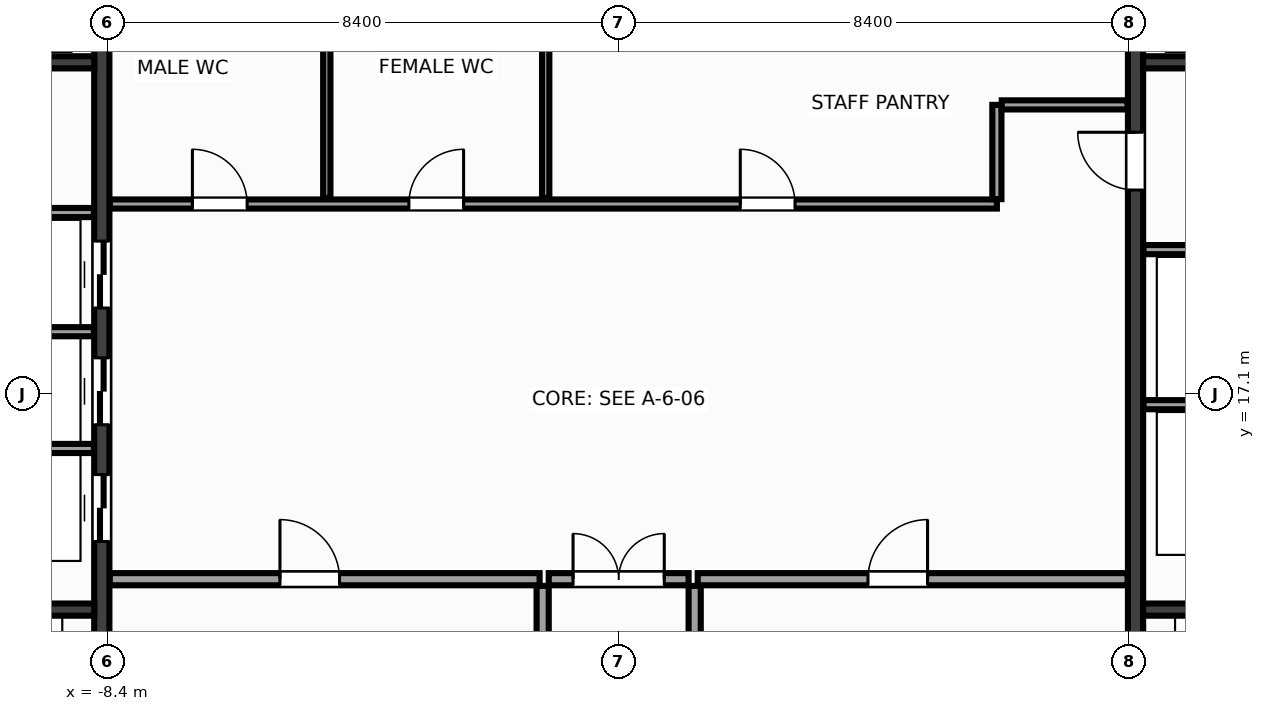
"""IFC4 building model, lengths in metres.
Left out: names, types, materials, properties, quantities, classifications, styles, units other than length and angle.
Written with IfcOpenShell. Run it as: python <this file> out.ifc"""

import sys

from ifc_helpers import new_model, si_unit, direction, frame, frame_2d, origin, place, context, subcontext, project, spatial, rectangle, extrude, source, transform, mapped, element, fill, save


model = new_model("IFC4")
c1 = context("Model", 3, precision=1e-05, world=origin(), true_north=direction((0.0, 1.0)))
c2 = subcontext(c1, "Body", "Model", "MODEL_VIEW")
j1 = project(units=[si_unit("LENGTHUNIT", "METRE"), si_unit("PLANEANGLEUNIT", "RADIAN")], contexts=[c1])
p1 = place(None, origin())
s1 = spatial("IfcSite", under=j1, at=p1, CompositionType="ELEMENT")
p2 = place(p1, origin())
s2 = spatial("IfcBuilding", under=s1, at=p2, CompositionType="ELEMENT")
p3 = place(p2, frame((0.0, 0.0, 203.6)))
s3 = spatial("IfcBuildingStorey", under=s2, at=p3, CompositionType="ELEMENT", Elevation=203.6)
m1 = source(origin(), c2, "Body", "SweptSolid", [
    extrude(rectangle(XDim=13.1, YDim=0.25, at=frame_2d((6.55, 0.0))), origin(), (0.0, 0.0, 1.0), 3.6),
])
p4 = place(p3, frame((-8.5, 10.45, 0.0), z_axis=(0.0, 0.0, 1.0), x_axis=(0.0, 1.0, 0.0)))
e1 = element("IfcWall", 1, at=p4, inside=s3, PredefinedType="SHEAR", context=c2, shape_type="MappedRepresentation", body=[
    mapped(m1, transform((0.0, 0.0, 0.0), x_axis=(1.0, 0.0, 0.0), y_axis=(0.0, 1.0, 0.0), z_axis=(0.0, 0.0, 1.0), scale=1.0)),
])
p5 = place(p4, frame((4.22, 0.0, 0.0)))
e2 = element("IfcOpeningElement", 2, at=p5, cuts=e1, PredefinedType="OPENING", context=c2, shape_type="SweptSolid", body=[
    extrude(rectangle(XDim=1.1, YDim=2.15, at=frame_2d((0.55, 1.075))), frame((0.0, 0.137, 0.0), z_axis=(0.0, -1.0, 0.0), x_axis=(1.0, 0.0, 0.0)), (0.0, 0.0, 1.0), 0.274),
])
p6 = place(p4, frame((6.14, 0.0, 0.0)))
e3 = element("IfcOpeningElement", 3, at=p6, cuts=e1, PredefinedType="OPENING", context=c2, shape_type="SweptSolid", body=[
    extrude(rectangle(XDim=1.1, YDim=2.15, at=frame_2d((0.55, 1.075))), frame((0.0, 0.137, 0.0), z_axis=(0.0, -1.0, 0.0), x_axis=(1.0, 0.0, 0.0)), (0.0, 0.0, 1.0), 0.274),
])
p7 = place(p4, frame((8.06, 0.0, 0.0)))
e4 = element("IfcOpeningElement", 4, at=p7, cuts=e1, PredefinedType="OPENING", context=c2, shape_type="SweptSolid", body=[
    extrude(rectangle(XDim=1.1, YDim=2.15, at=frame_2d((0.55, 1.075))), frame((0.0, 0.137, 0.0), z_axis=(0.0, -1.0, 0.0), x_axis=(1.0, 0.0, 0.0)), (0.0, 0.0, 1.0), 0.274),
])
p8 = place(p3, frame((8.5, 10.45, 0.0), z_axis=(0.0, 0.0, 1.0), x_axis=(0.0, 1.0, 0.0)))
e5 = element("IfcWall", 5, at=p8, inside=s3, PredefinedType="SHEAR", context=c2, shape_type="MappedRepresentation", body=[
    mapped(m1, transform((0.0, 0.0, 0.0), x_axis=(1.0, 0.0, 0.0), y_axis=(0.0, 1.0, 0.0), z_axis=(0.0, 0.0, 1.0), scale=1.0)),
])
p9 = place(p8, frame((10.0, 0.0, 0.0)))
e6 = element("IfcOpeningElement", 6, at=p9, cuts=e5, PredefinedType="OPENING", context=c2, shape_type="SweptSolid", body=[
    extrude(rectangle(XDim=0.95, YDim=2.15, at=frame_2d((0.475, 1.075))), frame((0.0, 0.137, 0.0), z_axis=(0.0, -1.0, 0.0), x_axis=(1.0, 0.0, 0.0)), (0.0, 0.0, 1.0), 0.274),
])
m2 = source(origin(), c2, "Body", "SweptSolid", [
    extrude(rectangle(XDim=2.825, YDim=0.2, at=frame_2d((1.413, 0.0))), origin(), (0.0, 0.0, 1.0), 3.6),
])
for number, where, z_axis, x_axis in (
    (7, (-11.45, 13.55, 0.0), (0.0, 0.0, 1.0), (1.0, 0.0, 0.0)),
    (8, (8.625, 13.55, 0.0), (0.0, 0.0, 1.0), (1.0, 0.0, 0.0)),
):
    element("IfcWall", number, at=place(p3, frame(where, z_axis=z_axis, x_axis=x_axis)), inside=s3, PredefinedType="SHEAR", context=c2, shape_type="MappedRepresentation", body=[
        mapped(m2, transform((0.0, 0.0, 0.0), x_axis=(1.0, 0.0, 0.0), y_axis=(0.0, 1.0, 0.0), z_axis=(0.0, 0.0, 1.0), scale=1.0)),
    ])
m3 = source(origin(), c2, "Body", "SweptSolid", [
    extrude(rectangle(XDim=3.02, YDim=0.2, at=frame_2d((1.51, 0.0))), origin(), (0.0, 0.0, 1.0), 3.6),
])
for number, where, z_axis, x_axis in (
    (9, (-11.645, 22.55, 0.0), (0.0, 0.0, 1.0), (1.0, 0.0, 0.0)),
    (10, (8.625, 22.55, 0.0), (0.0, 0.0, 1.0), (1.0, 0.0, 0.0)),
):
    element("IfcWall", number, at=place(p3, frame(where, z_axis=z_axis, x_axis=x_axis)), inside=s3, PredefinedType="SHEAR", context=c2, shape_type="MappedRepresentation", body=[
        mapped(m3, transform((0.0, 0.0, 0.0), x_axis=(1.0, 0.0, 0.0), y_axis=(0.0, 1.0, 0.0), z_axis=(0.0, 0.0, 1.0), scale=1.0)),
    ])
m4 = source(origin(), c2, "Body", "SweptSolid", [
    extrude(rectangle(XDim=3.01, YDim=0.15, at=frame_2d((1.505, 0.0))), origin(), (0.0, 0.0, 1.0), 3.38),
])
for number, where, z_axis, x_axis in (
    (11, (-11.64, 16.2, 0.0), (0.0, 0.0, 1.0), (1.0, 0.0, 0.0)),
    (12, (-11.64, 18.12, 0.0), (0.0, 0.0, 1.0), (1.0, 0.0, 0.0)),
    (13, (-11.64, 20.08, 0.0), (0.0, 0.0, 1.0), (1.0, 0.0, 0.0)),
    (14, (8.63, 16.92, 0.0), (0.0, 0.0, 1.0), (1.0, 0.0, 0.0)),
    (15, (8.63, 19.47, 0.0), (0.0, 0.0, 1.0), (1.0, 0.0, 0.0)),
):
    element("IfcWall", number, at=place(p3, frame(where, z_axis=z_axis, x_axis=x_axis)), inside=s3, PredefinedType="PARTITIONING", context=c2, shape_type="MappedRepresentation", body=[
        mapped(m4, transform((0.0, 0.0, 0.0), x_axis=(1.0, 0.0, 0.0), y_axis=(0.0, 1.0, 0.0), z_axis=(0.0, 0.0, 1.0), scale=1.0)),
    ])
m5 = source(origin(), c2, "Body", "SweptSolid", [
    extrude(rectangle(XDim=7.07, YDim=0.2, at=frame_2d((3.535, 0.0))), origin(), (0.0, 0.0, 1.0), 3.38),
])
p10 = place(p3, frame((-8.37, 14.05, 0.0), z_axis=(0.0, 0.0, 1.0), x_axis=(1.0, 0.0, 0.0)))
e16 = element("IfcWall", 16, at=p10, inside=s3, PredefinedType="PARTITIONING", context=c2, shape_type="MappedRepresentation", body=[
    mapped(m5, transform((0.0, 0.0, 0.0), x_axis=(1.0, 0.0, 0.0), y_axis=(0.0, 1.0, 0.0), z_axis=(0.0, 0.0, 1.0), scale=1.0)),
])
p11 = place(p10, frame((2.8, 0.0, 0.0)))
e17 = element("IfcOpeningElement", 17, at=p11, cuts=e16, PredefinedType="OPENING", context=c2, shape_type="SweptSolid", body=[
    extrude(rectangle(XDim=0.98, YDim=2.15, at=frame_2d((0.49, 1.075))), frame((0.0, 0.112, 0.0), z_axis=(0.0, -1.0, 0.0), x_axis=(1.0, 0.0, 0.0)), (0.0, 0.0, 1.0), 0.224),
])
p12 = place(p3, frame((1.3, 14.05, 0.0), z_axis=(0.0, 0.0, 1.0), x_axis=(1.0, 0.0, 0.0)))
e18 = element("IfcWall", 18, at=p12, inside=s3, PredefinedType="PARTITIONING", context=c2, shape_type="MappedRepresentation", body=[
    mapped(m5, transform((0.0, 0.0, 0.0), x_axis=(1.0, 0.0, 0.0), y_axis=(0.0, 1.0, 0.0), z_axis=(0.0, 0.0, 1.0), scale=1.0)),
])
p13 = place(p12, frame((2.8, 0.0, 0.0)))
e19 = element("IfcOpeningElement", 19, at=p13, cuts=e18, PredefinedType="OPENING", context=c2, shape_type="SweptSolid", body=[
    extrude(rectangle(XDim=0.98, YDim=2.15, at=frame_2d((0.49, 1.075))), frame((0.0, 0.112, 0.0), z_axis=(0.0, -1.0, 0.0), x_axis=(1.0, 0.0, 0.0)), (0.0, 0.0, 1.0), 0.224),
])
m6 = source(origin(), c2, "Body", "SweptSolid", [
    extrude(rectangle(XDim=3.49, YDim=0.2, at=frame_2d((1.745, 0.0))), origin(), (0.0, 0.0, 1.0), 3.38),
])
for number, where, z_axis, x_axis in (
    (20, (-1.25, 10.45, 0.0), (0.0, 0.0, 1.0), (0.0, 1.0, 0.0)),
    (21, (1.25, 10.45, 0.0), (0.0, 0.0, 1.0), (0.0, 1.0, 0.0)),
):
    element("IfcWall", number, at=place(p3, frame(where, z_axis=z_axis, x_axis=x_axis)), inside=s3, PredefinedType="PARTITIONING", context=c2, shape_type="MappedRepresentation", body=[
        mapped(m6, transform((0.0, 0.0, 0.0), x_axis=(1.0, 0.0, 0.0), y_axis=(0.0, 1.0, 0.0), z_axis=(0.0, 0.0, 1.0), scale=1.0)),
    ])
m7 = source(origin(), c2, "Body", "SweptSolid", [
    extrude(rectangle(XDim=2.3, YDim=0.2, at=frame_2d((1.15, 0.0))), origin(), (0.0, 0.0, 1.0), 3.38),
])
p14 = place(p3, frame((-1.15, 14.05, 0.0), z_axis=(0.0, 0.0, 1.0), x_axis=(1.0, 0.0, 0.0)))
e22 = element("IfcWall", 22, at=p14, inside=s3, PredefinedType="PARTITIONING", context=c2, shape_type="MappedRepresentation", body=[
    mapped(m7, transform((0.0, 0.0, 0.0), x_axis=(1.0, 0.0, 0.0), y_axis=(0.0, 1.0, 0.0), z_axis=(0.0, 0.0, 1.0), scale=1.0)),
])
p15 = place(p14, frame((0.4, 0.0, 0.0)))
e23 = element("IfcOpeningElement", 23, at=p15, cuts=e22, PredefinedType="OPENING", context=c2, shape_type="SweptSolid", body=[
    extrude(rectangle(XDim=1.5, YDim=2.2, at=frame_2d((0.75, 1.1))), frame((0.0, 0.112, 0.0), z_axis=(0.0, -1.0, 0.0), x_axis=(1.0, 0.0, 0.0)), (0.0, 0.0, 1.0), 0.224),
])
m8 = source(origin(), c2, "Body", "SweptSolid", [
    extrude(rectangle(XDim=14.59, YDim=0.15, at=frame_2d((7.295, 0.0))), origin(), (0.0, 0.0, 1.0), 3.38),
])
p16 = place(p3, frame((-8.37, 20.22, 0.0), z_axis=(0.0, 0.0, 1.0), x_axis=(1.0, 0.0, 0.0)))
e24 = element("IfcWall", 24, at=p16, inside=s3, PredefinedType="PARTITIONING", context=c2, shape_type="MappedRepresentation", body=[
    mapped(m8, transform((0.0, 0.0, 0.0), x_axis=(1.0, 0.0, 0.0), y_axis=(0.0, 1.0, 0.0), z_axis=(0.0, 0.0, 1.0), scale=1.0)),
])
p17 = place(p16, frame((1.36, 0.0, 0.0)))
e25 = element("IfcOpeningElement", 25, at=p17, cuts=e24, PredefinedType="OPENING", context=c2, shape_type="SweptSolid", body=[
    extrude(rectangle(XDim=0.9, YDim=2.15, at=frame_2d((0.45, 1.075))), frame((0.0, 0.087, 0.0), z_axis=(0.0, -1.0, 0.0), x_axis=(1.0, 0.0, 0.0)), (0.0, 0.0, 1.0), 0.174),
])
p18 = place(p16, frame((4.92, 0.0, 0.0)))
e26 = element("IfcOpeningElement", 26, at=p18, cuts=e24, PredefinedType="OPENING", context=c2, shape_type="SweptSolid", body=[
    extrude(rectangle(XDim=0.9, YDim=2.15, at=frame_2d((0.45, 1.075))), frame((0.0, 0.087, 0.0), z_axis=(0.0, -1.0, 0.0), x_axis=(1.0, 0.0, 0.0)), (0.0, 0.0, 1.0), 0.174),
])
p19 = place(p16, frame((10.37, 0.0, 0.0)))
e27 = element("IfcOpeningElement", 27, at=p19, cuts=e24, PredefinedType="OPENING", context=c2, shape_type="SweptSolid", body=[
    extrude(rectangle(XDim=0.9, YDim=2.15, at=frame_2d((0.45, 1.075))), frame((0.0, 0.087, 0.0), z_axis=(0.0, -1.0, 0.0), x_axis=(1.0, 0.0, 0.0)), (0.0, 0.0, 1.0), 0.174),
])
m9 = source(origin(), c2, "Body", "SweptSolid", [
    extrude(rectangle(XDim=1.55, YDim=0.15, at=frame_2d((0.775, 0.0))), origin(), (0.0, 0.0, 1.0), 3.38),
])
p20 = place(p3, frame((6.22, 20.3, 0.0), z_axis=(0.0, 0.0, 1.0), x_axis=(0.0, 1.0, 0.0)))
e28 = element("IfcWall", 28, at=p20, inside=s3, PredefinedType="PARTITIONING", context=c2, shape_type="MappedRepresentation", body=[
    mapped(m9, transform((0.0, 0.0, 0.0), x_axis=(1.0, 0.0, 0.0), y_axis=(0.0, 1.0, 0.0), z_axis=(0.0, 0.0, 1.0), scale=1.0)),
])
m10 = source(origin(), c2, "Body", "SweptSolid", [
    extrude(rectangle(XDim=2.07, YDim=0.15, at=frame_2d((1.035, 0.0))), origin(), (0.0, 0.0, 1.0), 3.38),
])
p21 = place(p3, frame((6.3, 21.85, 0.0), z_axis=(0.0, 0.0, 1.0), x_axis=(1.0, 0.0, 0.0)))
e29 = element("IfcWall", 29, at=p21, inside=s3, PredefinedType="PARTITIONING", context=c2, shape_type="MappedRepresentation", body=[
    mapped(m10, transform((0.0, 0.0, 0.0), x_axis=(1.0, 0.0, 0.0), y_axis=(0.0, 1.0, 0.0), z_axis=(0.0, 0.0, 1.0), scale=1.0)),
])
m11 = source(origin(), c2, "Body", "SweptSolid", [
    extrude(rectangle(XDim=3.19, YDim=0.12, at=frame_2d((1.595, 0.0))), origin(), (0.0, 0.0, 1.0), 3.38),
])
for number, where, z_axis, x_axis in (
    (30, (-4.8, 20.32, 0.0), (0.0, 0.0, 1.0), (0.0, 1.0, 0.0)),
    (31, (-1.2, 20.32, 0.0), (0.0, 0.0, 1.0), (0.0, 1.0, 0.0)),
):
    element("IfcWall", number, at=place(p3, frame(where, z_axis=z_axis, x_axis=x_axis)), inside=s3, PredefinedType="PARTITIONING", context=c2, shape_type="MappedRepresentation", body=[
        mapped(m11, transform((0.0, 0.0, 0.0), x_axis=(1.0, 0.0, 0.0), y_axis=(0.0, 1.0, 0.0), z_axis=(0.0, 0.0, 1.0), scale=1.0)),
    ])
m12 = source(origin(), c2, "Body", "SweptSolid", [
    extrude(rectangle(XDim=1.1, YDim=2.15, at=frame_2d((0.55, 1.075))), frame((0.0, 0.025, 0.0), z_axis=(0.0, -1.0, 0.0), x_axis=(1.0, 0.0, 0.0)), (0.0, 0.0, 1.0), 0.05),
])
p22 = place(p5, origin())
e32 = element("IfcDoor", 32, at=p22, inside=s3, OperationType="DOUBLE_DOOR_SLIDING", PredefinedType="DOOR", context=c2, shape_type="MappedRepresentation", body=[
    mapped(m12, transform((0.0, 0.0, 0.0), x_axis=(1.0, 0.0, 0.0), y_axis=(0.0, 1.0, 0.0), z_axis=(0.0, 0.0, 1.0), scale=1.0)),
])
fill(e2, e32)
p23 = place(p6, origin())
e33 = element("IfcDoor", 33, at=p23, inside=s3, OperationType="DOUBLE_DOOR_SLIDING", PredefinedType="DOOR", context=c2, shape_type="MappedRepresentation", body=[
    mapped(m12, transform((0.0, 0.0, 0.0), x_axis=(1.0, 0.0, 0.0), y_axis=(0.0, 1.0, 0.0), z_axis=(0.0, 0.0, 1.0), scale=1.0)),
])
fill(e3, e33)
p24 = place(p7, origin())
e34 = element("IfcDoor", 34, at=p24, inside=s3, OperationType="DOUBLE_DOOR_SLIDING", PredefinedType="DOOR", context=c2, shape_type="MappedRepresentation", body=[
    mapped(m12, transform((0.0, 0.0, 0.0), x_axis=(1.0, 0.0, 0.0), y_axis=(0.0, 1.0, 0.0), z_axis=(0.0, 0.0, 1.0), scale=1.0)),
])
fill(e4, e34)
m13 = source(origin(), c2, "Body", "SweptSolid", [
    extrude(rectangle(XDim=0.95, YDim=2.15, at=frame_2d((0.475, 1.075))), frame((0.0, 0.025, 0.0), z_axis=(0.0, -1.0, 0.0), x_axis=(1.0, 0.0, 0.0)), (0.0, 0.0, 1.0), 0.05),
])
p25 = place(p9, origin())
e35 = element("IfcDoor", 35, at=p25, inside=s3, OperationType="SINGLE_SWING_RIGHT", PredefinedType="DOOR", context=c2, shape_type="MappedRepresentation", body=[
    mapped(m13, transform((0.0, 0.0, 0.0), x_axis=(1.0, 0.0, 0.0), y_axis=(0.0, 1.0, 0.0), z_axis=(0.0, 0.0, 1.0), scale=1.0)),
])
fill(e6, e35)
m14 = source(origin(), c2, "Body", "SweptSolid", [
    extrude(rectangle(XDim=0.98, YDim=2.15, at=frame_2d((0.49, 1.075))), frame((0.0, 0.025, 0.0), z_axis=(0.0, -1.0, 0.0), x_axis=(1.0, 0.0, 0.0)), (0.0, 0.0, 1.0), 0.05),
])
p26 = place(p11, origin())
e36 = element("IfcDoor", 36, at=p26, inside=s3, OperationType="SINGLE_SWING_LEFT", PredefinedType="DOOR", context=c2, shape_type="MappedRepresentation", body=[
    mapped(m14, transform((0.0, 0.0, 0.0), x_axis=(1.0, 0.0, 0.0), y_axis=(0.0, 1.0, 0.0), z_axis=(0.0, 0.0, 1.0), scale=1.0)),
])
fill(e17, e36)
p27 = place(p13, origin())
e37 = element("IfcDoor", 37, at=p27, inside=s3, OperationType="SINGLE_SWING_RIGHT", PredefinedType="DOOR", context=c2, shape_type="MappedRepresentation", body=[
    mapped(m14, transform((0.0, 0.0, 0.0), x_axis=(1.0, 0.0, 0.0), y_axis=(0.0, 1.0, 0.0), z_axis=(0.0, 0.0, 1.0), scale=1.0)),
])
fill(e19, e37)
m15 = source(origin(), c2, "Body", "SweptSolid", [
    extrude(rectangle(XDim=1.5, YDim=2.2, at=frame_2d((0.75, 1.1))), frame((0.0, 0.025, 0.0), z_axis=(0.0, -1.0, 0.0), x_axis=(1.0, 0.0, 0.0)), (0.0, 0.0, 1.0), 0.05),
])
p28 = place(p15, origin())
e38 = element("IfcDoor", 38, at=p28, inside=s3, OperationType="DOUBLE_DOOR_SINGLE_SWING", PredefinedType="DOOR", context=c2, shape_type="MappedRepresentation", body=[
    mapped(m15, transform((0.0, 0.0, 0.0), x_axis=(1.0, 0.0, 0.0), y_axis=(0.0, 1.0, 0.0), z_axis=(0.0, 0.0, 1.0), scale=1.0)),
])
fill(e23, e38)
m16 = source(origin(), c2, "Body", "SweptSolid", [
    extrude(rectangle(XDim=0.9, YDim=2.15, at=frame_2d((0.45, 1.075))), frame((0.0, 0.025, 0.0), z_axis=(0.0, -1.0, 0.0), x_axis=(1.0, 0.0, 0.0)), (0.0, 0.0, 1.0), 0.05),
])
p29 = place(p17, origin())
e39 = element("IfcDoor", 39, at=p29, inside=s3, OperationType="SINGLE_SWING_LEFT", PredefinedType="DOOR", context=c2, shape_type="MappedRepresentation", body=[
    mapped(m16, transform((0.0, 0.0, 0.0), x_axis=(1.0, 0.0, 0.0), y_axis=(0.0, 1.0, 0.0), z_axis=(0.0, 0.0, 1.0), scale=1.0)),
])
fill(e25, e39)
p30 = place(p18, origin())
e40 = element("IfcDoor", 40, at=p30, inside=s3, OperationType="SINGLE_SWING_RIGHT", PredefinedType="DOOR", context=c2, shape_type="MappedRepresentation", body=[
    mapped(m16, transform((0.0, 0.0, 0.0), x_axis=(1.0, 0.0, 0.0), y_axis=(0.0, 1.0, 0.0), z_axis=(0.0, 0.0, 1.0), scale=1.0)),
])
fill(e26, e40)
p31 = place(p19, origin())
e41 = element("IfcDoor", 41, at=p31, inside=s3, OperationType="SINGLE_SWING_LEFT", PredefinedType="DOOR", context=c2, shape_type="MappedRepresentation", body=[
    mapped(m16, transform((0.0, 0.0, 0.0), x_axis=(1.0, 0.0, 0.0), y_axis=(0.0, 1.0, 0.0), z_axis=(0.0, 0.0, 1.0), scale=1.0)),
])
fill(e27, e41)
save(model, sys.argv[1])
